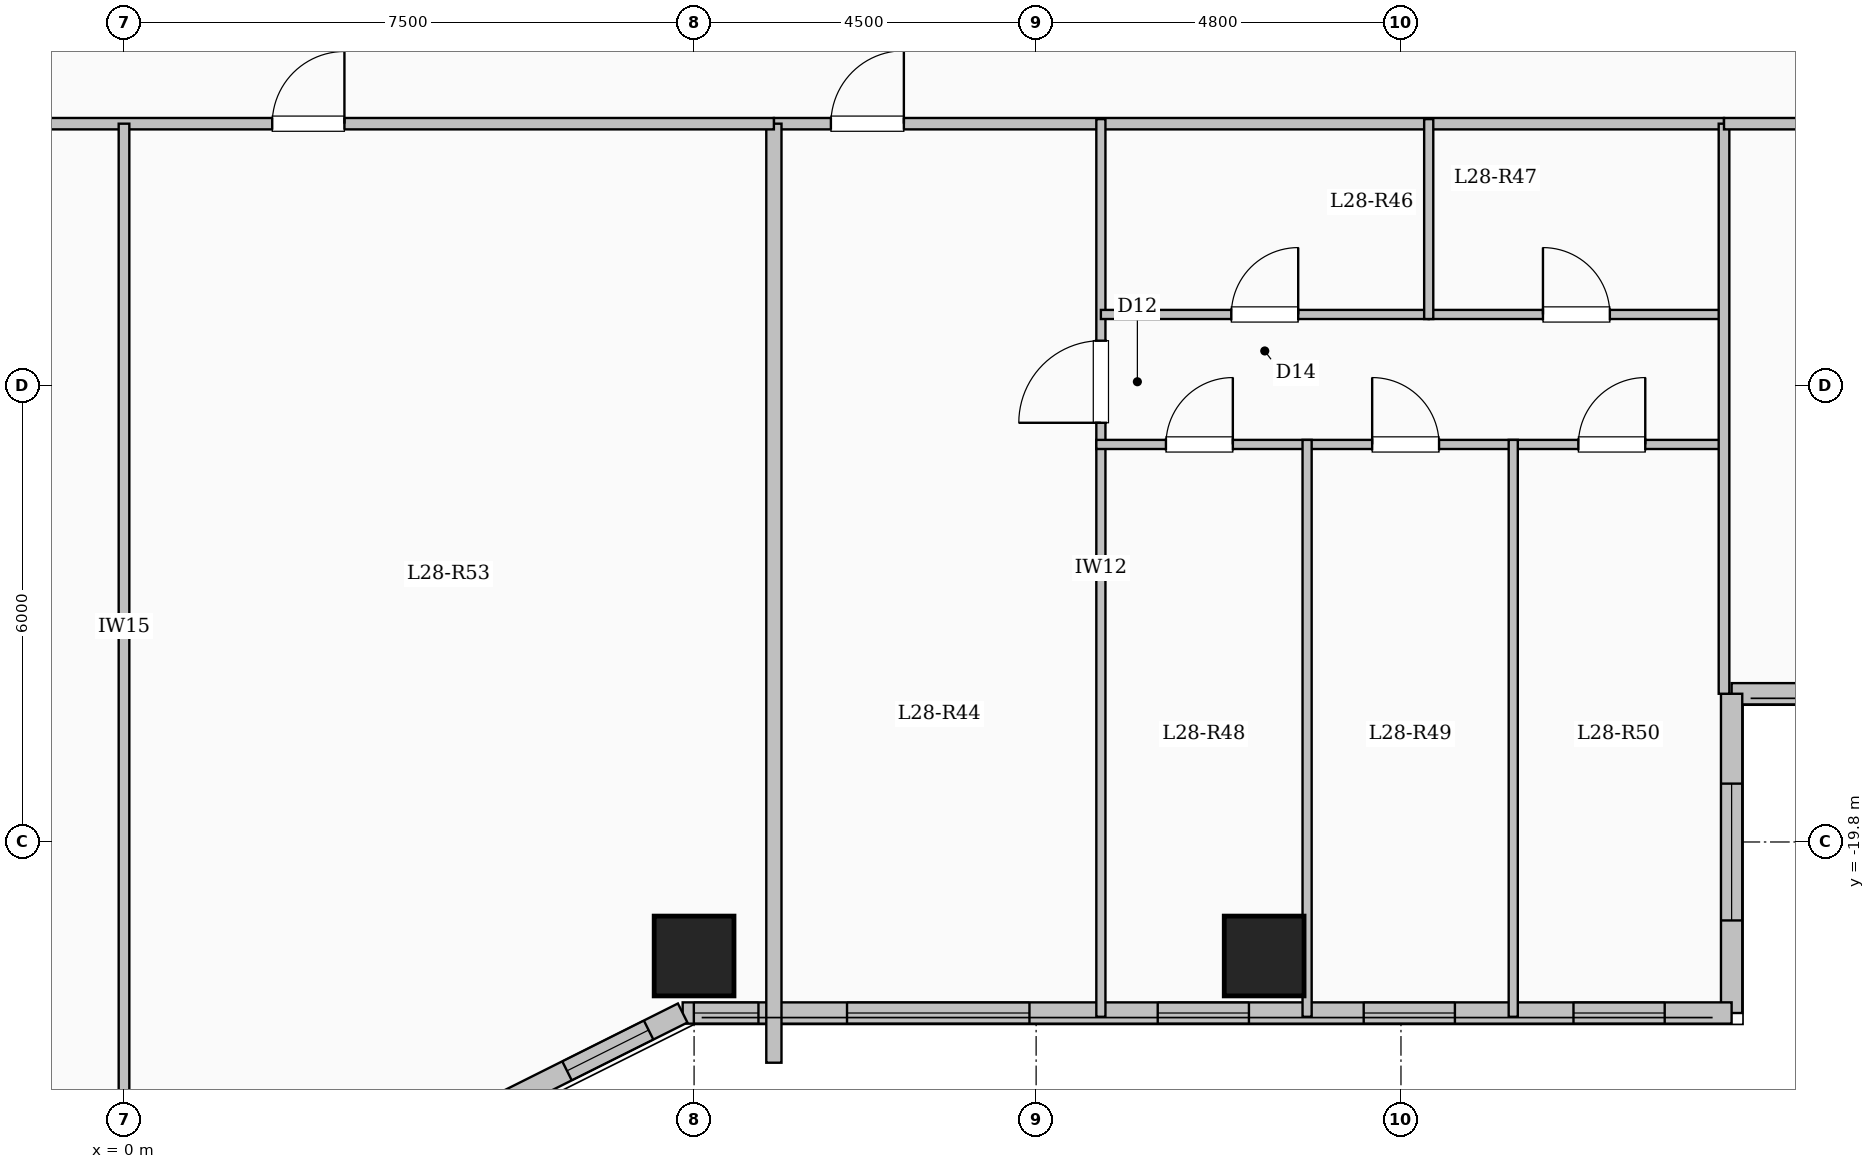
"""IFC4 building model, lengths in metres.
Left out: names, types, materials, properties, quantities, classifications, styles, units other than length and angle.
Written with IfcOpenShell. Run it as: python <this file> out.ifc"""

import sys

from ifc_helpers import new_model, si_unit, direction, frame, frame_2d, origin, origin_2d, place, context, subcontext, project, spatial, rectangle, extrude, element, fill, save


model = new_model("IFC4")
c1 = context("Model", 3, precision=1e-05, world=origin(), true_north=direction((0.0, 1.0)))
c2 = subcontext(c1, "Body", "Model", "MODEL_VIEW")
j1 = project(units=[si_unit("LENGTHUNIT", "METRE"), si_unit("PLANEANGLEUNIT", "RADIAN")], contexts=[c1])
p1 = place(None, origin())
s1 = spatial("IfcSite", under=j1, at=p1, CompositionType="ELEMENT")
p2 = place(p1, origin())
s2 = spatial("IfcBuilding", under=s1, at=p2, CompositionType="ELEMENT")
p3 = place(p2, frame((0.0, 0.0, 105.1)))
s3 = spatial("IfcBuildingStorey", under=s2, at=p3, CompositionType="ELEMENT", Elevation=105.1)
for number, where, z_axis, x_axis in (
    (1, (7.5, -21.3, 0.0), (0.0, 0.0, 1.0), (1.0, 0.0, 0.0)),
    (2, (15.0, -21.3, 0.0), (0.0, 0.0, 1.0), (1.0, 0.0, 0.0)),
):
    element("IfcColumn", number, at=place(p3, frame(where, z_axis=z_axis, x_axis=x_axis)), inside=s3, PredefinedType="COLUMN", context=c2, shape_type="SweptSolid", body=[
        extrude(rectangle(XDim=1.05, YDim=1.05, at=origin_2d()), origin(), (0.0, 0.0, 1.0), 3.35),
    ])
p4 = place(p3, frame((26.85, -17.85, 0.0), z_axis=(0.0, 0.0, 1.0), x_axis=(-1.0, 0.0, 0.0)))
e3 = element("IfcWall", 3, at=p4, inside=s3, PredefinedType="SOLIDWALL", context=c2, shape_type="SweptSolid", body=[
    extrude(rectangle(XDim=5.7, YDim=0.28, at=frame_2d((2.85, 0.0))), origin(), (0.0, 0.0, 1.0), 3.1),
])
p5 = place(p4, frame((1.675, 0.0, 0.9)))
e4 = element("IfcOpeningElement", 4, at=p5, cuts=e3, PredefinedType="OPENING", context=c2, shape_type="SweptSolid", body=[
    extrude(rectangle(XDim=2.4, YDim=1.8, at=frame_2d((1.2, 0.9))), frame((0.0, 0.15, 0.0), z_axis=(0.0, -1.0, 0.0), x_axis=(1.0, 0.0, 0.0)), (0.0, 0.0, 1.0), 0.3),
])
p6 = place(p3, frame((21.15, -17.85, 0.0), z_axis=(0.0, 0.0, 1.0), x_axis=(0.0, -1.0, 0.0)))
e5 = element("IfcWall", 5, at=p6, inside=s3, PredefinedType="SOLIDWALL", context=c2, shape_type="SweptSolid", body=[
    extrude(rectangle(XDim=4.2, YDim=0.28, at=frame_2d((2.1, 0.0))), origin(), (0.0, 0.0, 1.0), 3.1),
])
p7 = place(p6, frame((1.182, 0.0, 0.9)))
e6 = element("IfcOpeningElement", 6, at=p7, cuts=e5, PredefinedType="OPENING", context=c2, shape_type="SweptSolid", body=[
    extrude(rectangle(XDim=1.8, YDim=1.65, at=frame_2d((0.9, 0.825))), frame((0.0, 0.15, 0.0), z_axis=(0.0, -1.0, 0.0), x_axis=(1.0, 0.0, 0.0)), (0.0, 0.0, 1.0), 0.3),
])
p8 = place(p3, frame((21.15, -22.05, 0.0), z_axis=(0.0, 0.0, 1.0), x_axis=(-1.0, 0.0, 0.0)))
e7 = element("IfcWall", 7, at=p8, inside=s3, PredefinedType="SOLIDWALL", context=c2, shape_type="SweptSolid", body=[
    extrude(rectangle(XDim=13.8, YDim=0.28, at=frame_2d((6.9, 0.0))), origin(), (0.0, 0.0, 1.0), 3.1),
])
p9 = place(p8, frame((0.88, 0.0, 0.95)))
e8 = element("IfcOpeningElement", 8, at=p9, cuts=e7, PredefinedType="OPENING", context=c2, shape_type="SweptSolid", body=[
    extrude(rectangle(XDim=1.2, YDim=1.5, at=frame_2d((0.6, 0.75))), frame((0.0, 0.15, 0.0), z_axis=(0.0, -1.0, 0.0), x_axis=(1.0, 0.0, 0.0)), (0.0, 0.0, 1.0), 0.3),
])
p10 = place(p8, frame((3.64, 0.0, 0.95)))
e9 = element("IfcOpeningElement", 9, at=p10, cuts=e7, PredefinedType="OPENING", context=c2, shape_type="SweptSolid", body=[
    extrude(rectangle(XDim=1.2, YDim=1.5, at=frame_2d((0.6, 0.75))), frame((0.0, 0.15, 0.0), z_axis=(0.0, -1.0, 0.0), x_axis=(1.0, 0.0, 0.0)), (0.0, 0.0, 1.0), 0.3),
])
p11 = place(p8, frame((6.35, 0.0, 0.95)))
e10 = element("IfcOpeningElement", 10, at=p11, cuts=e7, PredefinedType="OPENING", context=c2, shape_type="SweptSolid", body=[
    extrude(rectangle(XDim=1.2, YDim=1.5, at=frame_2d((0.6, 0.75))), frame((0.0, 0.15, 0.0), z_axis=(0.0, -1.0, 0.0), x_axis=(1.0, 0.0, 0.0)), (0.0, 0.0, 1.0), 0.3),
])
p12 = place(p8, frame((9.238, 0.0, 0.9)))
e11 = element("IfcOpeningElement", 11, at=p12, cuts=e7, PredefinedType="OPENING", context=c2, shape_type="SweptSolid", body=[
    extrude(rectangle(XDim=2.4, YDim=1.8, at=frame_2d((1.2, 0.9))), frame((0.0, 0.15, 0.0), z_axis=(0.0, -1.0, 0.0), x_axis=(1.0, 0.0, 0.0)), (0.0, 0.0, 1.0), 0.3),
])
p13 = place(p8, frame((12.803, 0.0, 0.95)))
e12 = element("IfcOpeningElement", 12, at=p13, cuts=e7, PredefinedType="OPENING", context=c2, shape_type="SweptSolid", body=[
    extrude(rectangle(XDim=0.85, YDim=1.5, at=frame_2d((0.425, 0.75))), frame((0.0, 0.15, 0.0), z_axis=(0.0, -1.0, 0.0), x_axis=(1.0, 0.0, 0.0)), (0.0, 0.0, 1.0), 0.3),
])
p14 = place(p3, frame((7.35, -22.05, 0.0), z_axis=(0.0, 0.0, 1.0), x_axis=(-0.894427191, -0.4472135955, 0.0)))
e13 = element("IfcWall", 13, at=p14, inside=s3, PredefinedType="SOLIDWALL", context=c2, shape_type="SweptSolid", body=[
    extrude(rectangle(XDim=3.354, YDim=0.28, at=frame_2d((1.677, 0.0))), origin(), (0.0, 0.0, 1.0), 3.1),
])
p15 = place(p14, frame((0.501, 0.0, 0.95)))
e14 = element("IfcOpeningElement", 14, at=p15, cuts=e13, PredefinedType="OPENING", context=c2, shape_type="SweptSolid", body=[
    extrude(rectangle(XDim=1.2, YDim=1.5, at=frame_2d((0.6, 0.75))), frame((0.0, 0.15, 0.0), z_axis=(0.0, -1.0, 0.0), x_axis=(1.0, 0.0, 0.0)), (0.0, 0.0, 1.0), 0.3),
])
p16 = place(p3, frame((8.55, -10.35, 0.0), z_axis=(0.0, 0.0, 1.0), x_axis=(1.0, 0.0, 0.0)))
e15 = element("IfcWall", 15, at=p16, inside=s3, PredefinedType="PARTITIONING", context=c2, shape_type="SweptSolid", body=[
    extrude(rectangle(XDim=12.5, YDim=0.15, at=frame_2d((6.25, 0.0))), origin(), (0.0, 0.0, 1.0), 3.1),
])
p17 = place(p16, frame((0.75, 0.0, 0.0)))
e16 = element("IfcOpeningElement", 16, at=p17, cuts=e15, PredefinedType="OPENING", context=c2, shape_type="SweptSolid", body=[
    extrude(rectangle(XDim=0.96, YDim=2.15, at=frame_2d((0.48, 1.075))), frame((0.0, 0.085, 0.0), z_axis=(0.0, -1.0, 0.0), x_axis=(1.0, 0.0, 0.0)), (0.0, 0.0, 1.0), 0.17),
])
p18 = place(p3, frame((12.852, -22.1, 0.0), z_axis=(0.0, 0.0, 1.0), x_axis=(0.0, 1.0, 0.0)))
e17 = element("IfcWall", 17, at=p18, inside=s3, PredefinedType="PARTITIONING", context=c2, shape_type="SweptSolid", body=[
    extrude(rectangle(XDim=11.81, YDim=0.12, at=frame_2d((5.905, 0.0))), origin(), (0.0, 0.0, 1.0), 3.1),
])
p19 = place(p18, frame((7.815, 0.0, 0.0)))
e18 = element("IfcOpeningElement", 18, at=p19, cuts=e17, PredefinedType="OPENING", context=c2, shape_type="SweptSolid", body=[
    extrude(rectangle(XDim=1.08, YDim=2.15, at=frame_2d((0.54, 1.075))), frame((0.0, 0.07, 0.0), z_axis=(0.0, -1.0, 0.0), x_axis=(1.0, 0.0, 0.0)), (0.0, 0.0, 1.0), 0.14),
])
p20 = place(p3, frame((12.852, -12.86, 0.0), z_axis=(0.0, 0.0, 1.0), x_axis=(1.0, 0.0, 0.0)))
e19 = element("IfcWall", 19, at=p20, inside=s3, PredefinedType="PARTITIONING", context=c2, shape_type="SweptSolid", body=[
    extrude(rectangle(XDim=4.313, YDim=0.12, at=frame_2d((2.156, 0.0))), origin(), (0.0, 0.0, 1.0), 3.1),
])
p21 = place(p20, frame((1.716, 0.0, 0.0)))
e20 = element("IfcOpeningElement", 20, at=p21, cuts=e19, PredefinedType="OPENING", context=c2, shape_type="SweptSolid", body=[
    extrude(rectangle(XDim=0.88, YDim=2.1, at=frame_2d((0.44, 1.05))), frame((0.0, 0.07, 0.0), z_axis=(0.0, -1.0, 0.0), x_axis=(1.0, 0.0, 0.0)), (0.0, 0.0, 1.0), 0.14),
])
p22 = place(p3, frame((17.165, -12.86, 0.0), z_axis=(0.0, 0.0, 1.0), x_axis=(1.0, 0.0, 0.0)))
e21 = element("IfcWall", 21, at=p22, inside=s3, PredefinedType="PARTITIONING", context=c2, shape_type="SweptSolid", body=[
    extrude(rectangle(XDim=3.885, YDim=0.12, at=frame_2d((1.942, 0.0))), origin(), (0.0, 0.0, 1.0), 3.1),
])
p23 = place(p22, frame((1.503, 0.0, 0.0)))
e22 = element("IfcOpeningElement", 22, at=p23, cuts=e21, PredefinedType="OPENING", context=c2, shape_type="SweptSolid", body=[
    extrude(rectangle(XDim=0.88, YDim=2.1, at=frame_2d((0.44, 1.05))), frame((0.0, 0.07, 0.0), z_axis=(0.0, -1.0, 0.0), x_axis=(1.0, 0.0, 0.0)), (0.0, 0.0, 1.0), 0.14),
])
p24 = place(p3, frame((12.792, -14.57, 0.0), z_axis=(0.0, 0.0, 1.0), x_axis=(1.0, 0.0, 0.0)))
e23 = element("IfcWall", 23, at=p24, inside=s3, PredefinedType="PARTITIONING", context=c2, shape_type="SweptSolid", body=[
    extrude(rectangle(XDim=8.318, YDim=0.12, at=frame_2d((4.159, 0.0))), origin(), (0.0, 0.0, 1.0), 2.635),
])
p25 = place(p24, frame((0.916, 0.0, 0.0)))
e24 = element("IfcOpeningElement", 24, at=p25, cuts=e23, PredefinedType="OPENING", context=c2, shape_type="SweptSolid", body=[
    extrude(rectangle(XDim=0.88, YDim=2.1, at=frame_2d((0.44, 1.05))), frame((0.0, 0.07, 0.0), z_axis=(0.0, -1.0, 0.0), x_axis=(1.0, 0.0, 0.0)), (0.0, 0.0, 1.0), 0.14),
])
p26 = place(p24, frame((3.629, 0.0, 0.0)))
e25 = element("IfcOpeningElement", 25, at=p26, cuts=e23, PredefinedType="OPENING", context=c2, shape_type="SweptSolid", body=[
    extrude(rectangle(XDim=0.88, YDim=2.1, at=frame_2d((0.44, 1.05))), frame((0.0, 0.07, 0.0), z_axis=(0.0, -1.0, 0.0), x_axis=(1.0, 0.0, 0.0)), (0.0, 0.0, 1.0), 0.14),
])
p27 = place(p24, frame((6.342, 0.0, 0.0)))
e26 = element("IfcOpeningElement", 26, at=p27, cuts=e23, PredefinedType="OPENING", context=c2, shape_type="SweptSolid", body=[
    extrude(rectangle(XDim=0.88, YDim=2.1, at=frame_2d((0.44, 1.05))), frame((0.0, 0.07, 0.0), z_axis=(0.0, -1.0, 0.0), x_axis=(1.0, 0.0, 0.0)), (0.0, 0.0, 1.0), 0.14),
])
p28 = place(p3, frame((17.165, -12.92, 0.0), z_axis=(0.0, 0.0, 1.0), x_axis=(0.0, 1.0, 0.0)))
e27 = element("IfcWall", 27, at=p28, inside=s3, PredefinedType="PARTITIONING", context=c2, shape_type="SweptSolid", body=[
    extrude(rectangle(XDim=2.63, YDim=0.12, at=frame_2d((1.315, 0.0))), origin(), (0.0, 0.0, 1.0), 3.1),
])
for number, where, z_axis, x_axis in (
    (28, (15.565, -22.1, 0.0), (0.0, 0.0, 1.0), (0.0, 1.0, 0.0)),
    (29, (18.277, -22.1, 0.0), (0.0, 0.0, 1.0), (0.0, 1.0, 0.0)),
):
    element("IfcWall", number, at=place(p3, frame(where, z_axis=z_axis, x_axis=x_axis)), inside=s3, PredefinedType="PARTITIONING", context=c2, shape_type="SweptSolid", body=[
        extrude(rectangle(XDim=7.59, YDim=0.12, at=frame_2d((3.795, 0.0))), origin(), (0.0, 0.0, 1.0), 3.1),
    ])
p29 = place(p3, frame((8.55, -22.704, 0.0), z_axis=(0.0, 0.0, 1.0), x_axis=(0.0, 1.0, 0.0)))
e30 = element("IfcWall", 30, at=p29, inside=s3, PredefinedType="SOLIDWALL", context=c2, shape_type="SweptSolid", body=[
    extrude(rectangle(XDim=12.354, YDim=0.2, at=frame_2d((6.177, 0.0))), origin(), (0.0, 0.0, 1.0), 3.1),
])
p30 = place(p3, frame((-8.55, -10.35, 0.0), z_axis=(0.0, 0.0, 1.0), x_axis=(1.0, 0.0, 0.0)))
e31 = element("IfcWall", 31, at=p30, inside=s3, PredefinedType="PARTITIONING", context=c2, shape_type="SweptSolid", body=[
    extrude(rectangle(XDim=17.1, YDim=0.15, at=frame_2d((8.55, 0.0))), origin(), (0.0, 0.0, 1.0), 3.1),
])
p31 = place(p30, frame((1.6, 0.0, 0.0)))
e32 = element("IfcOpeningElement", 32, at=p31, cuts=e31, PredefinedType="OPENING", context=c2, shape_type="SweptSolid", body=[
    extrude(rectangle(XDim=0.95, YDim=2.15, at=frame_2d((0.475, 1.075))), frame((0.0, 0.085, 0.0), z_axis=(0.0, -1.0, 0.0), x_axis=(1.0, 0.0, 0.0)), (0.0, 0.0, 1.0), 0.17),
])
p32 = place(p30, frame((10.5, 0.0, 0.0)))
e33 = element("IfcOpeningElement", 33, at=p32, cuts=e31, PredefinedType="OPENING", context=c2, shape_type="SweptSolid", body=[
    extrude(rectangle(XDim=0.95, YDim=2.15, at=frame_2d((0.475, 1.075))), frame((0.0, 0.085, 0.0), z_axis=(0.0, -1.0, 0.0), x_axis=(1.0, 0.0, 0.0)), (0.0, 0.0, 1.0), 0.17),
])
p33 = place(p3, frame((0.0, -23.58, 0.0), z_axis=(0.0, 0.0, 1.0), x_axis=(0.0, 1.0, 0.0)))
e34 = element("IfcWall", 34, at=p33, inside=s3, PredefinedType="PARTITIONING", context=c2, shape_type="SweptSolid", body=[
    extrude(rectangle(XDim=13.23, YDim=0.14, at=frame_2d((6.615, 0.0))), origin(), (0.0, 0.0, 1.0), 3.1),
])
p34 = place(p3, frame((21.05, -17.85, 0.0), z_axis=(0.0, 0.0, 1.0), x_axis=(0.0, 1.0, 0.0)))
e35 = element("IfcWall", 35, at=p34, inside=s3, PredefinedType="PARTITIONING", context=c2, shape_type="SweptSolid", body=[
    extrude(rectangle(XDim=7.5, YDim=0.14, at=frame_2d((3.75, 0.0))), origin(), (0.0, 0.0, 1.0), 3.1),
])
p35 = place(p3, frame((21.05, -10.35, 0.0), z_axis=(0.0, 0.0, 1.0), x_axis=(1.0, 0.0, 0.0)))
e36 = element("IfcWall", 36, at=p35, inside=s3, PredefinedType="PARTITIONING", context=c2, shape_type="SweptSolid", body=[
    extrude(rectangle(XDim=5.83, YDim=0.15, at=frame_2d((2.915, 0.0))), origin(), (0.0, 0.0, 1.0), 3.1),
])
p36 = place(p35, frame((2.44, 0.0, 0.0)))
e37 = element("IfcOpeningElement", 37, at=p36, cuts=e36, PredefinedType="OPENING", context=c2, shape_type="SweptSolid", body=[
    extrude(rectangle(XDim=0.95, YDim=2.15, at=frame_2d((0.475, 1.075))), frame((0.0, 0.085, 0.0), z_axis=(0.0, -1.0, 0.0), x_axis=(1.0, 0.0, 0.0)), (0.0, 0.0, 1.0), 0.17),
])
p37 = place(p7, origin())
e38 = element("IfcWindow", 38, at=p37, inside=s3, PartitioningType="SINGLE_PANEL", PredefinedType="WINDOW", context=c2, shape_type="SweptSolid", body=[
    extrude(rectangle(XDim=1.8, YDim=1.65, at=frame_2d((0.9, 0.825))), frame((0.0, 0.03, 0.0), z_axis=(0.0, -1.0, 0.0), x_axis=(1.0, 0.0, 0.0)), (0.0, 0.0, 1.0), 0.06),
])
fill(e6, e38)
p38 = place(p9, origin())
e39 = element("IfcWindow", 39, at=p38, inside=s3, PartitioningType="SINGLE_PANEL", PredefinedType="WINDOW", context=c2, shape_type="SweptSolid", body=[
    extrude(rectangle(XDim=1.2, YDim=1.5, at=frame_2d((0.6, 0.75))), frame((0.0, 0.03, 0.0), z_axis=(0.0, -1.0, 0.0), x_axis=(1.0, 0.0, 0.0)), (0.0, 0.0, 1.0), 0.06),
])
fill(e8, e39)
p39 = place(p10, origin())
e40 = element("IfcWindow", 40, at=p39, inside=s3, PartitioningType="SINGLE_PANEL", PredefinedType="WINDOW", context=c2, shape_type="SweptSolid", body=[
    extrude(rectangle(XDim=1.2, YDim=1.5, at=frame_2d((0.6, 0.75))), frame((0.0, 0.03, 0.0), z_axis=(0.0, -1.0, 0.0), x_axis=(1.0, 0.0, 0.0)), (0.0, 0.0, 1.0), 0.06),
])
fill(e9, e40)
p40 = place(p11, origin())
e41 = element("IfcWindow", 41, at=p40, inside=s3, PartitioningType="SINGLE_PANEL", PredefinedType="WINDOW", context=c2, shape_type="SweptSolid", body=[
    extrude(rectangle(XDim=1.2, YDim=1.5, at=frame_2d((0.6, 0.75))), frame((0.0, 0.03, 0.0), z_axis=(0.0, -1.0, 0.0), x_axis=(1.0, 0.0, 0.0)), (0.0, 0.0, 1.0), 0.06),
])
fill(e10, e41)
p41 = place(p12, origin())
e42 = element("IfcWindow", 42, at=p41, inside=s3, PartitioningType="SINGLE_PANEL", PredefinedType="WINDOW", context=c2, shape_type="SweptSolid", body=[
    extrude(rectangle(XDim=2.4, YDim=1.8, at=frame_2d((1.2, 0.9))), frame((0.0, 0.03, 0.0), z_axis=(0.0, -1.0, 0.0), x_axis=(1.0, 0.0, 0.0)), (0.0, 0.0, 1.0), 0.06),
])
fill(e11, e42)
p42 = place(p13, origin())
e43 = element("IfcWindow", 43, at=p42, inside=s3, PartitioningType="SINGLE_PANEL", PredefinedType="WINDOW", context=c2, shape_type="SweptSolid", body=[
    extrude(rectangle(XDim=0.85, YDim=1.5, at=frame_2d((0.425, 0.75))), frame((0.0, 0.03, 0.0), z_axis=(0.0, -1.0, 0.0), x_axis=(1.0, 0.0, 0.0)), (0.0, 0.0, 1.0), 0.06),
])
fill(e12, e43)
p43 = place(p15, origin())
e44 = element("IfcWindow", 44, at=p43, inside=s3, PartitioningType="SINGLE_PANEL", PredefinedType="WINDOW", context=c2, shape_type="SweptSolid", body=[
    extrude(rectangle(XDim=1.2, YDim=1.5, at=frame_2d((0.6, 0.75))), frame((0.0, 0.03, 0.0), z_axis=(0.0, -1.0, 0.0), x_axis=(1.0, 0.0, 0.0)), (0.0, 0.0, 1.0), 0.06),
])
fill(e14, e44)
p44 = place(p17, origin())
e45 = element("IfcDoor", 45, at=p44, inside=s3, OperationType="SINGLE_SWING_RIGHT", PredefinedType="DOOR", context=c2, shape_type="SweptSolid", body=[
    extrude(rectangle(XDim=0.96, YDim=2.15, at=frame_2d((0.48, 1.075))), frame((0.0, 0.025, 0.0), z_axis=(0.0, -1.0, 0.0), x_axis=(1.0, 0.0, 0.0)), (0.0, 0.0, 1.0), 0.05),
])
fill(e16, e45)
p45 = place(p19, origin())
e46 = element("IfcDoor", 46, at=p45, inside=s3, OperationType="SINGLE_SWING_LEFT", PredefinedType="DOOR", context=c2, shape_type="SweptSolid", body=[
    extrude(rectangle(XDim=1.08, YDim=2.15, at=frame_2d((0.54, 1.075))), frame((0.0, 0.025, 0.0), z_axis=(0.0, -1.0, 0.0), x_axis=(1.0, 0.0, 0.0)), (0.0, 0.0, 1.0), 0.05),
])
fill(e18, e46)
p46 = place(p21, origin())
e47 = element("IfcDoor", 47, at=p46, inside=s3, OperationType="SINGLE_SWING_RIGHT", PredefinedType="DOOR", context=c2, shape_type="SweptSolid", body=[
    extrude(rectangle(XDim=0.88, YDim=2.1, at=frame_2d((0.44, 1.05))), frame((0.0, 0.025, 0.0), z_axis=(0.0, -1.0, 0.0), x_axis=(1.0, 0.0, 0.0)), (0.0, 0.0, 1.0), 0.05),
])
fill(e20, e47)
p47 = place(p23, origin())
e48 = element("IfcDoor", 48, at=p47, inside=s3, OperationType="SINGLE_SWING_LEFT", PredefinedType="DOOR", context=c2, shape_type="SweptSolid", body=[
    extrude(rectangle(XDim=0.88, YDim=2.1, at=frame_2d((0.44, 1.05))), frame((0.0, 0.025, 0.0), z_axis=(0.0, -1.0, 0.0), x_axis=(1.0, 0.0, 0.0)), (0.0, 0.0, 1.0), 0.05),
])
fill(e22, e48)
p48 = place(p25, origin())
e49 = element("IfcDoor", 49, at=p48, inside=s3, OperationType="SINGLE_SWING_RIGHT", PredefinedType="DOOR", context=c2, shape_type="SweptSolid", body=[
    extrude(rectangle(XDim=0.88, YDim=2.1, at=frame_2d((0.44, 1.05))), frame((0.0, 0.025, 0.0), z_axis=(0.0, -1.0, 0.0), x_axis=(1.0, 0.0, 0.0)), (0.0, 0.0, 1.0), 0.05),
])
fill(e24, e49)
p49 = place(p26, origin())
e50 = element("IfcDoor", 50, at=p49, inside=s3, OperationType="SINGLE_SWING_LEFT", PredefinedType="DOOR", context=c2, shape_type="SweptSolid", body=[
    extrude(rectangle(XDim=0.88, YDim=2.1, at=frame_2d((0.44, 1.05))), frame((0.0, 0.025, 0.0), z_axis=(0.0, -1.0, 0.0), x_axis=(1.0, 0.0, 0.0)), (0.0, 0.0, 1.0), 0.05),
])
fill(e25, e50)
p50 = place(p27, origin())
e51 = element("IfcDoor", 51, at=p50, inside=s3, OperationType="SINGLE_SWING_RIGHT", PredefinedType="DOOR", context=c2, shape_type="SweptSolid", body=[
    extrude(rectangle(XDim=0.88, YDim=2.1, at=frame_2d((0.44, 1.05))), frame((0.0, 0.025, 0.0), z_axis=(0.0, -1.0, 0.0), x_axis=(1.0, 0.0, 0.0)), (0.0, 0.0, 1.0), 0.05),
])
fill(e26, e51)
p51 = place(p32, origin())
e52 = element("IfcDoor", 52, at=p51, inside=s3, OperationType="SINGLE_SWING_RIGHT", PredefinedType="DOOR", context=c2, shape_type="SweptSolid", body=[
    extrude(rectangle(XDim=0.95, YDim=2.15, at=frame_2d((0.475, 1.075))), frame((0.0, 0.025, 0.0), z_axis=(0.0, -1.0, 0.0), x_axis=(1.0, 0.0, 0.0)), (0.0, 0.0, 1.0), 0.05),
])
fill(e33, e52)
save(model, sys.argv[1])
